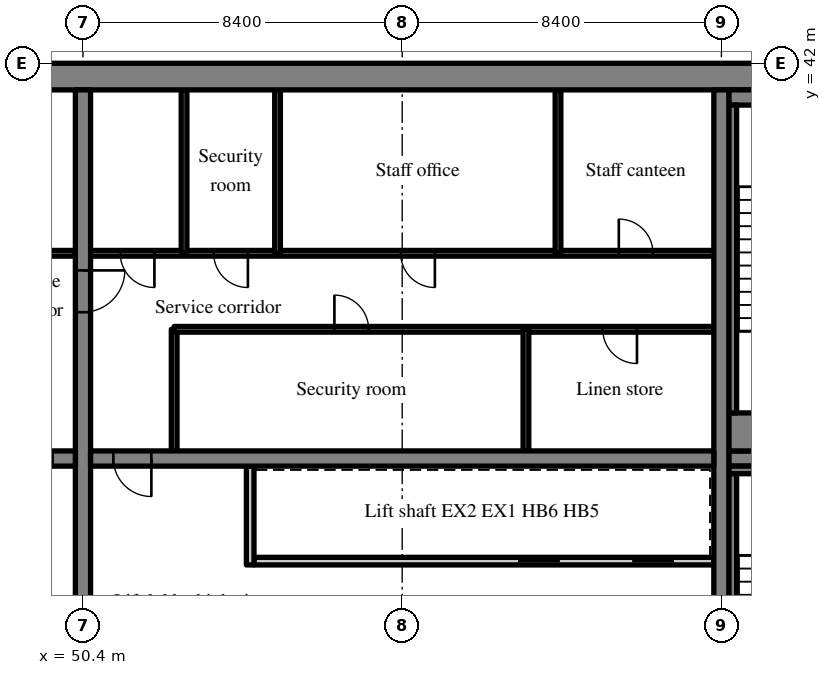
"""IFC4 building model, lengths in metres.
Left out: names, types, materials, properties, quantities, classifications, styles, units other than length and angle.
Written with IfcOpenShell. Run it as: python <this file> out.ifc"""

import sys

from ifc_helpers import new_model, si_unit, direction, frame, frame_2d, origin, place, context, subcontext, project, spatial, rectangle, extrude, source, transform, mapped, element, fill, save


model = new_model("IFC4")
c1 = context("Model", 3, precision=1e-05, world=origin(), true_north=direction((0.0, 1.0)))
c2 = subcontext(c1, "Body", "Model", "MODEL_VIEW")
j1 = project(units=[si_unit("LENGTHUNIT", "METRE"), si_unit("PLANEANGLEUNIT", "RADIAN")], contexts=[c1])
p1 = place(None, origin())
s1 = spatial("IfcSite", under=j1, at=p1, CompositionType="ELEMENT")
p2 = place(p1, origin())
s2 = spatial("IfcBuilding", under=s1, at=p2, CompositionType="ELEMENT")
p3 = place(p2, frame((0.0, 0.0, 193.4)))
s3 = spatial("IfcBuildingStorey", under=s2, at=p3, CompositionType="ELEMENT", Elevation=193.4)
m1 = source(origin(), c2, "Body", "SweptSolid", [
    extrude(rectangle(XDim=50.4, YDim=0.7, at=frame_2d((25.2, 0.0))), origin(), (0.0, 0.0, 1.0), 3.52),
])
p4 = place(p3, frame((25.2, 41.65, 0.0), z_axis=(0.0, 0.0, 1.0), x_axis=(1.0, 0.0, 0.0)))
e1 = element("IfcWall", 1, at=p4, inside=s3, PredefinedType="SHEAR", context=c2, shape_type="MappedRepresentation", body=[
    mapped(m1, transform((0.0, 0.0, 0.0), scale=1.0)),
])
m2 = source(origin(), c2, "Body", "SweptSolid", [
    extrude(rectangle(XDim=18.6, YDim=0.4, at=frame_2d((9.3, 0.0))), origin(), (0.0, 0.0, 1.0), 3.52),
])
p5 = place(p3, frame((50.4, 22.7, 0.0), z_axis=(0.0, 0.0, 1.0), x_axis=(0.0, 1.0, 0.0)))
e2 = element("IfcWall", 2, at=p5, inside=s3, PredefinedType="SHEAR", context=c2, shape_type="MappedRepresentation", body=[
    mapped(m2, transform((0.0, 0.0, 0.0), scale=1.0)),
])
m3 = source(origin(), c2, "Body", "SweptSolid", [
    extrude(rectangle(XDim=1.1, YDim=2.1, at=frame_2d((0.55, 1.05))), frame((0.0, 0.21, 0.0), z_axis=(0.0, -1.0, 0.0), x_axis=(1.0, 0.0, 0.0)), (0.0, 0.0, 1.0), 0.42),
])
p6 = place(p5, frame((12.75, 0.0, 0.0)))
e3 = element("IfcOpeningElement", 3, at=p6, cuts=e2, PredefinedType="OPENING", context=c2, shape_type="MappedRepresentation", body=[
    mapped(m3, transform((0.0, 0.0, 0.0), scale=1.0)),
])
p7 = place(p3, frame((67.2, 22.7, 0.0), z_axis=(0.0, 0.0, 1.0), x_axis=(0.0, 1.0, 0.0)))
e4 = element("IfcWall", 4, at=p7, inside=s3, PredefinedType="SHEAR", context=c2, shape_type="MappedRepresentation", body=[
    mapped(m2, transform((0.0, 0.0, 0.0), scale=1.0)),
])
m4 = source(origin(), c2, "Body", "SweptSolid", [
    extrude(rectangle(XDim=16.4, YDim=0.4, at=frame_2d((8.2, 0.0))), origin(), (0.0, 0.0, 1.0), 3.52),
])
p8 = place(p3, frame((33.8, 31.6, 0.0), z_axis=(0.0, 0.0, 1.0), x_axis=(1.0, 0.0, 0.0)))
e5 = element("IfcWall", 5, at=p8, inside=s3, PredefinedType="SHEAR", context=c2, shape_type="MappedRepresentation", body=[
    mapped(m4, transform((0.0, 0.0, 0.0), scale=1.0)),
])
m5 = source(origin(), c2, "Body", "SweptSolid", [
    extrude(rectangle(XDim=1.0, YDim=2.1, at=frame_2d((0.5, 1.05))), frame((0.0, 0.21, 0.0), z_axis=(0.0, -1.0, 0.0), x_axis=(1.0, 0.0, 0.0)), (0.0, 0.0, 1.0), 0.42),
])
p9 = place(p8, frame((14.8, 0.0, 0.0)))
e6 = element("IfcOpeningElement", 6, at=p9, cuts=e5, PredefinedType="OPENING", context=c2, shape_type="MappedRepresentation", body=[
    mapped(m5, transform((0.0, 0.0, 0.0), scale=1.0)),
])
p10 = place(p3, frame((50.6, 31.6, 0.0), z_axis=(0.0, 0.0, 1.0), x_axis=(1.0, 0.0, 0.0)))
e7 = element("IfcWall", 7, at=p10, inside=s3, PredefinedType="SHEAR", context=c2, shape_type="MappedRepresentation", body=[
    mapped(m4, transform((0.0, 0.0, 0.0), scale=1.0)),
])
p11 = place(p10, frame((0.6, 0.0, 0.0)))
e8 = element("IfcOpeningElement", 8, at=p11, cuts=e7, PredefinedType="OPENING", context=c2, shape_type="MappedRepresentation", body=[
    mapped(m5, transform((0.0, 0.0, 0.0), scale=1.0)),
])
m6 = source(origin(), c2, "Body", "SweptSolid", [
    extrude(rectangle(XDim=7.5, YDim=0.4, at=frame_2d((3.75, 0.0))), origin(), (0.0, 0.0, 1.0), 3.52),
])
p12 = place(p3, frame((67.4, 31.6, 0.0), z_axis=(0.0, 0.0, 1.0), x_axis=(1.0, 0.0, 0.0)))
e9 = element("IfcWall", 9, at=p12, inside=s3, PredefinedType="SHEAR", context=c2, shape_type="MappedRepresentation", body=[
    mapped(m6, transform((0.0, 0.0, 0.0), scale=1.0)),
])
p13 = place(p12, frame((5.725, 0.0, 0.0)))
e10 = element("IfcOpeningElement", 10, at=p13, cuts=e9, PredefinedType="OPENING", context=c2, shape_type="MappedRepresentation", body=[
    mapped(m3, transform((0.0, 0.0, 0.0), scale=1.0)),
])
m7 = source(origin(), c2, "Body", "SweptSolid", [
    extrude(rectangle(XDim=16.4, YDim=0.15, at=frame_2d((8.2, 0.0))), origin(), (0.0, 0.0, 1.0), 3.52),
])
p14 = place(p3, frame((33.8, 37.0, 0.0), z_axis=(0.0, 0.0, 1.0), x_axis=(1.0, 0.0, 0.0)))
e11 = element("IfcWall", 11, at=p14, inside=s3, PredefinedType="PARTITIONING", context=c2, shape_type="MappedRepresentation", body=[
    mapped(m7, transform((0.0, 0.0, 0.0), scale=1.0)),
])
m8 = source(origin(), c2, "Body", "SweptSolid", [
    extrude(rectangle(XDim=0.9, YDim=2.1, at=frame_2d((0.45, 1.05))), frame((0.0, 0.085, 0.0), z_axis=(0.0, -1.0, 0.0), x_axis=(1.0, 0.0, 0.0)), (0.0, 0.0, 1.0), 0.17),
])
p15 = place(p14, frame((6.52, 0.0, 0.0)))
e12 = element("IfcOpeningElement", 12, at=p15, cuts=e11, PredefinedType="OPENING", context=c2, shape_type="MappedRepresentation", body=[
    mapped(m8, transform((0.0, 0.0, 0.0), scale=1.0)),
])
p16 = place(p14, frame((14.72, 0.0, 0.0)))
e13 = element("IfcOpeningElement", 13, at=p16, cuts=e11, PredefinedType="OPENING", context=c2, shape_type="MappedRepresentation", body=[
    mapped(m8, transform((0.0, 0.0, 0.0), scale=1.0)),
])
m9 = source(origin(), c2, "Body", "SweptSolid", [
    extrude(rectangle(XDim=12.1, YDim=0.2, at=frame_2d((6.05, 0.0))), origin(), (0.0, 0.0, 1.0), 3.52),
])
p17 = place(p3, frame((67.0, 28.9, 0.0), z_axis=(0.0, 0.0, 1.0), x_axis=(-1.0, 0.0, 0.0)))
e14 = element("IfcWall", 14, at=p17, inside=s3, PredefinedType="SOLIDWALL", context=c2, shape_type="MappedRepresentation", body=[
    mapped(m9, transform((0.0, 0.0, 0.0), scale=1.0)),
])
m10 = source(origin(), c2, "Body", "SweptSolid", [
    extrude(rectangle(XDim=1.1, YDim=2.1, at=frame_2d((0.55, 1.05))), frame((0.0, 0.11, 0.0), z_axis=(0.0, -1.0, 0.0), x_axis=(1.0, 0.0, 0.0)), (0.0, 0.0, 1.0), 0.22),
])
p18 = place(p17, frame((1.05, 0.0, 0.0)))
e15 = element("IfcOpeningElement", 15, at=p18, cuts=e14, PredefinedType="OPENING", context=c2, shape_type="MappedRepresentation", body=[
    mapped(m10, transform((0.0, 0.0, 0.0), scale=1.0)),
])
p19 = place(p17, frame((4.05, 0.0, 0.0)))
e16 = element("IfcOpeningElement", 16, at=p19, cuts=e14, PredefinedType="OPENING", context=c2, shape_type="MappedRepresentation", body=[
    mapped(m10, transform((0.0, 0.0, 0.0), scale=1.0)),
])
m11 = source(origin(), c2, "Body", "SweptSolid", [
    extrude(rectangle(XDim=2.6, YDim=0.2, at=frame_2d((1.3, 0.0))), origin(), (0.0, 0.0, 1.0), 3.52),
])
p20 = place(p3, frame((54.8, 28.8, 0.0), z_axis=(0.0, 0.0, 1.0), x_axis=(0.0, 1.0, 0.0)))
e17 = element("IfcWall", 17, at=p20, inside=s3, PredefinedType="SOLIDWALL", context=c2, shape_type="MappedRepresentation", body=[
    mapped(m11, transform((0.0, 0.0, 0.0), scale=1.0)),
])
m12 = source(origin(), c2, "Body", "SweptSolid", [
    extrude(rectangle(XDim=3.2, YDim=0.15, at=frame_2d((1.6, 0.0))), origin(), (0.0, 0.0, 1.0), 3.52),
])
p21 = place(p3, frame((52.8, 31.8, 0.0), z_axis=(0.0, 0.0, 1.0), x_axis=(0.0, 1.0, 0.0)))
e18 = element("IfcWall", 18, at=p21, inside=s3, PredefinedType="PARTITIONING", context=c2, shape_type="MappedRepresentation", body=[
    mapped(m12, transform((0.0, 0.0, 0.0), scale=1.0)),
])
m13 = source(origin(), c2, "Body", "SweptSolid", [
    extrude(rectangle(XDim=14.2, YDim=0.15, at=frame_2d((7.1, 0.0))), origin(), (0.0, 0.0, 1.0), 3.52),
])
p22 = place(p3, frame((67.0, 35.0, 0.0), z_axis=(0.0, 0.0, 1.0), x_axis=(-1.0, 0.0, 0.0)))
e19 = element("IfcWall", 19, at=p22, inside=s3, PredefinedType="PARTITIONING", context=c2, shape_type="MappedRepresentation", body=[
    mapped(m13, transform((0.0, 0.0, 0.0), scale=1.0)),
])
p23 = place(p22, frame((2.022, 0.0, 0.0)))
e20 = element("IfcOpeningElement", 20, at=p23, cuts=e19, PredefinedType="OPENING", context=c2, shape_type="MappedRepresentation", body=[
    mapped(m8, transform((0.0, 0.0, 0.0), scale=1.0)),
])
p24 = place(p22, frame((9.084, 0.0, 0.0)))
e21 = element("IfcOpeningElement", 21, at=p24, cuts=e19, PredefinedType="OPENING", context=c2, shape_type="MappedRepresentation", body=[
    mapped(m8, transform((0.0, 0.0, 0.0), scale=1.0)),
])
p25 = place(p3, frame((67.0, 37.0, 0.0), z_axis=(0.0, 0.0, 1.0), x_axis=(-1.0, 0.0, 0.0)))
e22 = element("IfcWall", 22, at=p25, inside=s3, PredefinedType="PARTITIONING", context=c2, shape_type="MappedRepresentation", body=[
    mapped(m7, transform((0.0, 0.0, 0.0), scale=1.0)),
])
p26 = place(p25, frame((1.6, 0.0, 0.0)))
e23 = element("IfcOpeningElement", 23, at=p26, cuts=e22, PredefinedType="OPENING", context=c2, shape_type="MappedRepresentation", body=[
    mapped(m8, transform((0.0, 0.0, 0.0), scale=1.0)),
])
p27 = place(p25, frame((7.34, 0.0, 0.0)))
e24 = element("IfcOpeningElement", 24, at=p27, cuts=e22, PredefinedType="OPENING", context=c2, shape_type="MappedRepresentation", body=[
    mapped(m8, transform((0.0, 0.0, 0.0), scale=1.0)),
])
p28 = place(p25, frame((12.26, 0.0, 0.0)))
e25 = element("IfcOpeningElement", 25, at=p28, cuts=e22, PredefinedType="OPENING", context=c2, shape_type="MappedRepresentation", body=[
    mapped(m8, transform((0.0, 0.0, 0.0), scale=1.0)),
])
p29 = place(p25, frame((14.72, 0.0, 0.0)))
e26 = element("IfcOpeningElement", 26, at=p29, cuts=e22, PredefinedType="OPENING", context=c2, shape_type="MappedRepresentation", body=[
    mapped(m8, transform((0.0, 0.0, 0.0), scale=1.0)),
])
p30 = place(p3, frame((62.056, 31.8, 0.0), z_axis=(0.0, 0.0, 1.0), x_axis=(0.0, 1.0, 0.0)))
e27 = element("IfcWall", 27, at=p30, inside=s3, PredefinedType="PARTITIONING", context=c2, shape_type="MappedRepresentation", body=[
    mapped(m12, transform((0.0, 0.0, 0.0), scale=1.0)),
])
m14 = source(origin(), c2, "Body", "SweptSolid", [
    extrude(rectangle(XDim=4.3, YDim=0.15, at=frame_2d((2.15, 0.0))), origin(), (0.0, 0.0, 1.0), 3.52),
])
for number, where, z_axis, x_axis in (
    (28, (62.9, 37.0, 0.0), (0.0, 0.0, 1.0), (0.0, 1.0, 0.0)),
    (29, (55.52, 37.0, 0.0), (0.0, 0.0, 1.0), (0.0, 1.0, 0.0)),
    (30, (53.06, 37.0, 0.0), (0.0, 0.0, 1.0), (0.0, 1.0, 0.0)),
):
    element("IfcWall", number, at=place(p3, frame(where, z_axis=z_axis, x_axis=x_axis)), inside=s3, PredefinedType="PARTITIONING", context=c2, shape_type="MappedRepresentation", body=[
        mapped(m14, transform((0.0, 0.0, 0.0), scale=1.0)),
    ])
m15 = source(origin(), c2, "Body", "SweptSolid", [
    extrude(rectangle(XDim=4.85, YDim=0.2, at=frame_2d((2.425, 0.0))), origin(), (0.0, 0.0, 1.0), 3.52),
])
p31 = place(p3, frame((67.4, 31.3, 0.0), z_axis=(0.0, 0.0, 1.0), x_axis=(1.0, 0.0, 0.0)))
e31 = element("IfcWall", 31, at=p31, inside=s3, PredefinedType="SOLIDWALL", context=c2, shape_type="MappedRepresentation", body=[
    mapped(m15, transform((0.0, 0.0, 0.0), scale=1.0)),
])
m16 = source(origin(), c2, "Body", "SweptSolid", [
    extrude(rectangle(XDim=8.1, YDim=0.2, at=frame_2d((4.05, 0.0))), origin(), (0.0, 0.0, 1.0), 3.52),
])
p32 = place(p3, frame((67.5, 23.1, 0.0), z_axis=(0.0, 0.0, 1.0), x_axis=(0.0, 1.0, 0.0)))
e32 = element("IfcWall", 32, at=p32, inside=s3, PredefinedType="SOLIDWALL", context=c2, shape_type="MappedRepresentation", body=[
    mapped(m16, transform((0.0, 0.0, 0.0), scale=1.0)),
])
m17 = source(origin(), c2, "Body", "SweptSolid", [
    extrude(rectangle(XDim=4.85, YDim=0.4, at=frame_2d((2.425, 0.0))), origin(), (0.0, 0.0, 1.0), 3.52),
])
p33 = place(p3, frame((67.4, 41.1, 0.0), z_axis=(0.0, 0.0, 1.0), x_axis=(1.0, 0.0, 0.0)))
e33 = element("IfcWall", 33, at=p33, inside=s3, PredefinedType="SOLIDWALL", context=c2, shape_type="MappedRepresentation", body=[
    mapped(m17, transform((0.0, 0.0, 0.0), scale=1.0)),
])
m18 = source(origin(), c2, "Body", "SweptSolid", [
    extrude(rectangle(XDim=4.85, YDim=1.0, at=frame_2d((2.425, 0.0))), origin(), (0.0, 0.0, 1.0), 3.52),
])
p34 = place(p3, frame((67.4, 32.3, 0.0), z_axis=(0.0, 0.0, 1.0), x_axis=(1.0, 0.0, 0.0)))
e34 = element("IfcWall", 34, at=p34, inside=s3, PredefinedType="SOLIDWALL", context=c2, shape_type="MappedRepresentation", body=[
    mapped(m18, transform((0.0, 0.0, 0.0), scale=1.0)),
])
p35 = place(p3, frame((67.5, 32.8, 0.0), z_axis=(0.0, 0.0, 1.0), x_axis=(0.0, 1.0, 0.0)))
e35 = element("IfcWall", 35, at=p35, inside=s3, PredefinedType="SOLIDWALL", context=c2, shape_type="MappedRepresentation", body=[
    mapped(m16, transform((0.0, 0.0, 0.0), scale=1.0)),
])
m19 = source(origin(), c2, "Body", "SweptSolid", [
    extrude(rectangle(XDim=1.0, YDim=2.1, at=frame_2d((0.5, 1.05))), frame((0.0, 0.025, 0.0), z_axis=(0.0, -1.0, 0.0), x_axis=(1.0, 0.0, 0.0)), (0.0, 0.0, 1.0), 0.05),
])
p36 = place(p11, origin())
e36 = element("IfcDoor", 36, at=p36, inside=s3, OperationType="SINGLE_SWING_RIGHT", PredefinedType="DOOR", context=c2, shape_type="MappedRepresentation", body=[
    mapped(m19, transform((0.0, 0.0, 0.0), scale=1.0)),
])
fill(e8, e36)
m20 = source(origin(), c2, "Body", "SweptSolid", [
    extrude(rectangle(XDim=1.1, YDim=2.1, at=frame_2d((0.55, 1.05))), frame((0.0, 0.025, 0.0), z_axis=(0.0, -1.0, 0.0), x_axis=(1.0, 0.0, 0.0)), (0.0, 0.0, 1.0), 0.05),
])
p37 = place(p18, origin())
e37 = element("IfcDoor", 37, at=p37, inside=s3, OperationType="SLIDING_TO_RIGHT", PredefinedType="DOOR", context=c2, shape_type="MappedRepresentation", body=[
    mapped(m20, transform((0.0, 0.0, 0.0), scale=1.0)),
])
fill(e15, e37)
p38 = place(p19, origin())
e38 = element("IfcDoor", 38, at=p38, inside=s3, OperationType="SLIDING_TO_LEFT", PredefinedType="DOOR", context=c2, shape_type="MappedRepresentation", body=[
    mapped(m20, transform((0.0, 0.0, 0.0), scale=1.0)),
])
fill(e16, e38)
m21 = source(origin(), c2, "Body", "SweptSolid", [
    extrude(rectangle(XDim=0.9, YDim=2.1, at=frame_2d((0.45, 1.05))), frame((0.0, 0.025, 0.0), z_axis=(0.0, -1.0, 0.0), x_axis=(1.0, 0.0, 0.0)), (0.0, 0.0, 1.0), 0.05),
])
p39 = place(p23, origin())
e39 = element("IfcDoor", 39, at=p39, inside=s3, OperationType="SINGLE_SWING_LEFT", PredefinedType="DOOR", context=c2, shape_type="MappedRepresentation", body=[
    mapped(m21, transform((0.0, 0.0, 0.0), scale=1.0)),
])
fill(e20, e39)
p40 = place(p24, origin())
e40 = element("IfcDoor", 40, at=p40, inside=s3, OperationType="SINGLE_SWING_RIGHT", PredefinedType="DOOR", context=c2, shape_type="MappedRepresentation", body=[
    mapped(m21, transform((0.0, 0.0, 0.0), scale=1.0)),
])
fill(e21, e40)
p41 = place(p26, origin())
e41 = element("IfcDoor", 41, at=p41, inside=s3, OperationType="SINGLE_SWING_RIGHT", PredefinedType="DOOR", context=c2, shape_type="MappedRepresentation", body=[
    mapped(m21, transform((0.0, 0.0, 0.0), scale=1.0)),
])
fill(e23, e41)
p42 = place(p27, origin())
e42 = element("IfcDoor", 42, at=p42, inside=s3, OperationType="SINGLE_SWING_LEFT", PredefinedType="DOOR", context=c2, shape_type="MappedRepresentation", body=[
    mapped(m21, transform((0.0, 0.0, 0.0), scale=1.0)),
])
fill(e24, e42)
p43 = place(p28, origin())
e43 = element("IfcDoor", 43, at=p43, inside=s3, OperationType="SINGLE_SWING_LEFT", PredefinedType="DOOR", context=c2, shape_type="MappedRepresentation", body=[
    mapped(m21, transform((0.0, 0.0, 0.0), scale=1.0)),
])
fill(e25, e43)
p44 = place(p29, origin())
e44 = element("IfcDoor", 44, at=p44, inside=s3, OperationType="SINGLE_SWING_LEFT", PredefinedType="DOOR", context=c2, shape_type="MappedRepresentation", body=[
    mapped(m21, transform((0.0, 0.0, 0.0), scale=1.0)),
])
fill(e26, e44)
p45 = place(p6, origin())
e45 = element("IfcDoor", 45, at=p45, inside=s3, OperationType="SINGLE_SWING_RIGHT", PredefinedType="DOOR", context=c2, shape_type="MappedRepresentation", body=[
    mapped(m20, transform((0.0, 0.0, 0.0), scale=1.0)),
])
fill(e3, e45)
save(model, sys.argv[1])
